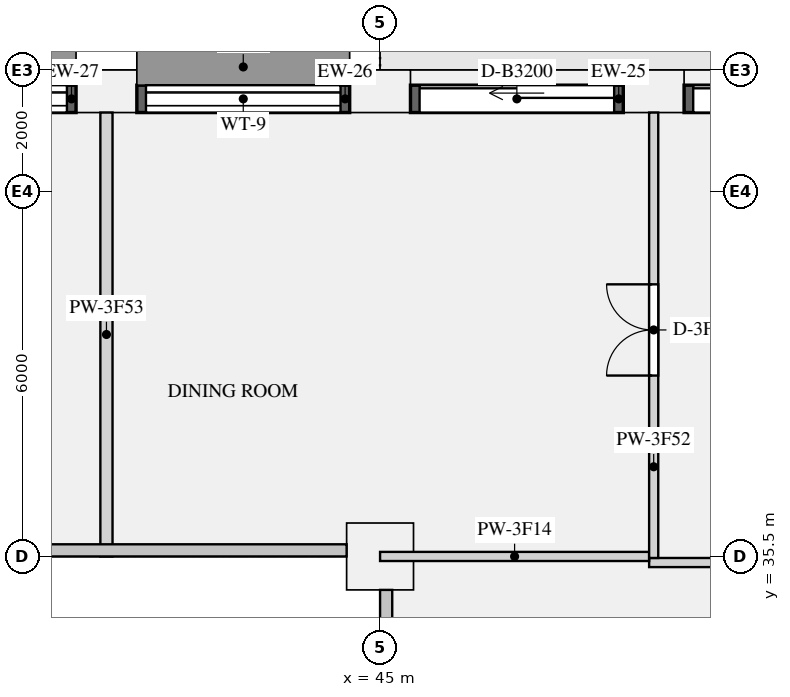
"""IFC4 building model, lengths in metres.
Left out: names, types, materials, properties, quantities, classifications, styles, units other than length and angle.
Written with IfcOpenShell. Run it as: python <this file> out.ifc"""

import sys

from ifc_helpers import new_model, si_unit, direction, frame, frame_2d, origin, origin_2d, place, context, subcontext, project, spatial, rectangle, extrude, element, fill, save


model = new_model("IFC4")
c1 = context("Model", 3, precision=1e-05, world=origin(), true_north=direction((0.0, 1.0)))
c2 = subcontext(c1, "Body", "Model", "MODEL_VIEW")
j1 = project(units=[si_unit("LENGTHUNIT", "METRE"), si_unit("PLANEANGLEUNIT", "RADIAN")], contexts=[c1])
p1 = place(None, origin())
s1 = spatial("IfcSite", under=j1, at=p1, CompositionType="ELEMENT")
p2 = place(p1, origin())
s2 = spatial("IfcBuilding", under=s1, at=p2, CompositionType="ELEMENT")
p3 = place(p2, frame((0.0, 0.0, 179.1)))
s3 = spatial("IfcBuildingStorey", under=s2, at=p3, CompositionType="ELEMENT", Elevation=179.1)
for number, where, z_axis, x_axis in (
    (1, (49.5, 43.15, 0.0), (0.0, 0.0, 1.0), (-1.0, 0.0, 0.0)),
    (2, (45.0, 43.15, 0.0), (0.0, 0.0, 1.0), (-1.0, 0.0, 0.0)),
    (3, (40.5, 43.15, 0.0), (0.0, 0.0, 1.0), (-1.0, 0.0, 0.0)),
):
    element("IfcColumn", number, at=place(p3, frame(where, z_axis=z_axis, x_axis=x_axis)), inside=s3, PredefinedType="USERDEFINED", context=c2, shape_type="SweptSolid", body=[
        extrude(rectangle(XDim=1.0, YDim=0.7, at=origin_2d()), origin(), (0.0, 0.0, 1.0), 3.15),
    ])
p4 = place(p3, frame((45.0, 35.5, 0.0), z_axis=(0.0, 0.0, 1.0), x_axis=(1.0, 0.0, 0.0)))
e4 = element("IfcColumn", 4, at=p4, inside=s3, PredefinedType="COLUMN", context=c2, shape_type="SweptSolid", body=[
    extrude(rectangle(XDim=1.1, YDim=1.1, at=origin_2d()), origin(), (0.0, 0.0, 1.0), 3.15),
])
p5 = place(p3, frame((53.5, 43.025, 0.0), z_axis=(0.0, 0.0, 1.0), x_axis=(-1.0, 0.0, 0.0)))
e5 = element("IfcWall", 5, at=p5, inside=s3, PredefinedType="SOLIDWALL", context=c2, shape_type="SweptSolid", body=[
    extrude(rectangle(XDim=3.5, YDim=0.45, at=frame_2d((1.75, 0.0))), origin(), (0.0, 0.0, 1.0), 2.83),
])
p6 = place(p5, frame((0.15, 0.0, 0.0)))
e6 = element("IfcOpeningElement", 6, at=p6, cuts=e5, PredefinedType="OPENING", context=c2, shape_type="SweptSolid", body=[
    extrude(rectangle(XDim=3.2, YDim=2.3, at=frame_2d((1.6, 1.15))), frame((0.0, 0.235, 0.0), z_axis=(0.0, -1.0, 0.0), x_axis=(1.0, 0.0, 0.0)), (0.0, 0.0, 1.0), 0.47),
])
p7 = place(p3, frame((49.0, 43.025, 0.0), z_axis=(0.0, 0.0, 1.0), x_axis=(-1.0, 0.0, 0.0)))
e7 = element("IfcWall", 7, at=p7, inside=s3, PredefinedType="SOLIDWALL", context=c2, shape_type="SweptSolid", body=[
    extrude(rectangle(XDim=3.5, YDim=0.45, at=frame_2d((1.75, 0.0))), origin(), (0.0, 0.0, 1.0), 2.83),
])
p8 = place(p7, frame((0.15, 0.0, 0.0)))
e8 = element("IfcOpeningElement", 8, at=p8, cuts=e7, PredefinedType="OPENING", context=c2, shape_type="SweptSolid", body=[
    extrude(rectangle(XDim=3.2, YDim=2.3, at=frame_2d((1.6, 1.15))), frame((0.0, 0.235, 0.0), z_axis=(0.0, -1.0, 0.0), x_axis=(1.0, 0.0, 0.0)), (0.0, 0.0, 1.0), 0.47),
])
p9 = place(p3, frame((44.5, 43.025, 0.9), z_axis=(0.0, 0.0, 1.0), x_axis=(-1.0, 0.0, 0.0)))
e9 = element("IfcWall", 9, at=p9, inside=s3, PredefinedType="SOLIDWALL", context=c2, shape_type="SweptSolid", body=[
    extrude(rectangle(XDim=3.5, YDim=0.45, at=frame_2d((1.75, 0.0))), origin(), (0.0, 0.0, 1.0), 1.93),
])
p10 = place(p9, frame((0.15, 0.0, 0.15)))
e10 = element("IfcOpeningElement", 10, at=p10, cuts=e9, PredefinedType="OPENING", context=c2, shape_type="SweptSolid", body=[
    extrude(rectangle(XDim=3.2, YDim=1.5, at=frame_2d((1.6, 0.75))), frame((0.0, 0.235, 0.0), z_axis=(0.0, -1.0, 0.0), x_axis=(1.0, 0.0, 0.0)), (0.0, 0.0, 1.0), 0.47),
])
p11 = place(p3, frame((40.0, 43.025, 0.9), z_axis=(0.0, 0.0, 1.0), x_axis=(-1.0, 0.0, 0.0)))
e11 = element("IfcWall", 11, at=p11, inside=s3, PredefinedType="SOLIDWALL", context=c2, shape_type="SweptSolid", body=[
    extrude(rectangle(XDim=3.5, YDim=0.45, at=frame_2d((1.75, 0.0))), origin(), (0.0, 0.0, 1.0), 1.93),
])
p12 = place(p11, frame((0.15, 0.0, 0.15)))
e12 = element("IfcOpeningElement", 12, at=p12, cuts=e11, PredefinedType="OPENING", context=c2, shape_type="SweptSolid", body=[
    extrude(rectangle(XDim=3.2, YDim=1.5, at=frame_2d((1.6, 0.75))), frame((0.0, 0.235, 0.0), z_axis=(0.0, -1.0, 0.0), x_axis=(1.0, 0.0, 0.0)), (0.0, 0.0, 1.0), 0.47),
])
p13 = place(p3, frame((49.425, 35.4, 0.0), z_axis=(0.0, 0.0, 1.0), x_axis=(1.0, 0.0, 0.0)))
e13 = element("IfcWall", 13, at=p13, inside=s3, PredefinedType="PARTITIONING", context=c2, shape_type="SweptSolid", body=[
    extrude(rectangle(XDim=6.775, YDim=0.15, at=frame_2d((3.387, 0.0))), origin(), (0.0, 0.0, 1.0), 2.83),
])
p14 = place(p13, frame((1.6, 0.0, 0.0)))
e14 = element("IfcOpeningElement", 14, at=p14, cuts=e13, PredefinedType="OPENING", context=c2, shape_type="SweptSolid", body=[
    extrude(rectangle(XDim=0.9, YDim=2.1, at=frame_2d((0.45, 1.05))), frame((0.0, 0.085, 0.0), z_axis=(0.0, -1.0, 0.0), x_axis=(1.0, 0.0, 0.0)), (0.0, 0.0, 1.0), 0.17),
])
p15 = place(p3, frame((45.0, 35.5, 0.0), z_axis=(0.0, 0.0, 1.0), x_axis=(1.0, 0.0, 0.0)))
e15 = element("IfcWall", 15, at=p15, inside=s3, PredefinedType="PARTITIONING", context=c2, shape_type="SweptSolid", body=[
    extrude(rectangle(XDim=4.425, YDim=0.15, at=frame_2d((2.212, 0.0))), origin(), (0.0, 0.0, 1.0), 2.83),
])
p16 = place(p3, frame((49.5, 35.475, 0.0), z_axis=(0.0, 0.0, 1.0), x_axis=(0.0, 1.0, 0.0)))
e16 = element("IfcWall", 16, at=p16, inside=s3, PredefinedType="PARTITIONING", context=c2, shape_type="SweptSolid", body=[
    extrude(rectangle(XDim=7.325, YDim=0.15, at=frame_2d((3.663, 0.0))), origin(), (0.0, 0.0, 1.0), 2.83),
])
p17 = place(p16, frame((3.0, 0.0, 0.0)))
e17 = element("IfcOpeningElement", 17, at=p17, cuts=e16, PredefinedType="OPENING", context=c2, shape_type="SweptSolid", body=[
    extrude(rectangle(XDim=1.5, YDim=2.1, at=frame_2d((0.75, 1.05))), frame((0.0, 0.085, 0.0), z_axis=(0.0, -1.0, 0.0), x_axis=(1.0, 0.0, 0.0)), (0.0, 0.0, 1.0), 0.17),
])
p18 = place(p3, frame((40.5, 35.5, 0.0), z_axis=(0.0, 0.0, 1.0), x_axis=(0.0, 1.0, 0.0)))
e18 = element("IfcWall", 18, at=p18, inside=s3, PredefinedType="PARTITIONING", context=c2, shape_type="SweptSolid", body=[
    extrude(rectangle(XDim=7.3, YDim=0.2, at=frame_2d((3.65, 0.0))), origin(), (0.0, 0.0, 1.0), 2.83),
])
p19 = place(p6, origin())
e19 = element("IfcDoor", 19, at=p19, inside=s3, OperationType="SLIDING_TO_LEFT", PredefinedType="DOOR", context=c2, shape_type="SweptSolid", body=[
    extrude(rectangle(XDim=3.2, YDim=2.3, at=frame_2d((1.6, 1.15))), frame((0.0, -0.07, 0.0), z_axis=(0.0, -1.0, 0.0), x_axis=(1.0, 0.0, 0.0)), (0.0, 0.0, 1.0), 0.05),
])
fill(e6, e19)
p20 = place(p8, origin())
e20 = element("IfcDoor", 20, at=p20, inside=s3, OperationType="SLIDING_TO_LEFT", PredefinedType="DOOR", context=c2, shape_type="SweptSolid", body=[
    extrude(rectangle(XDim=3.2, YDim=2.3, at=frame_2d((1.6, 1.15))), frame((0.0, -0.07, 0.0), z_axis=(0.0, -1.0, 0.0), x_axis=(1.0, 0.0, 0.0)), (0.0, 0.0, 1.0), 0.05),
])
fill(e8, e20)
p21 = place(p10, origin())
e21 = element("IfcWindow", 21, at=p21, inside=s3, PartitioningType="SINGLE_PANEL", PredefinedType="WINDOW", context=c2, shape_type="SweptSolid", body=[
    extrude(rectangle(XDim=3.2, YDim=1.5, at=frame_2d((1.6, 0.75))), frame((0.0, -0.065, 0.0), z_axis=(0.0, -1.0, 0.0), x_axis=(1.0, 0.0, 0.0)), (0.0, 0.0, 1.0), 0.06),
])
fill(e10, e21)
p22 = place(p12, origin())
e22 = element("IfcWindow", 22, at=p22, inside=s3, PartitioningType="SINGLE_PANEL", PredefinedType="WINDOW", context=c2, shape_type="SweptSolid", body=[
    extrude(rectangle(XDim=3.2, YDim=1.5, at=frame_2d((1.6, 0.75))), frame((0.0, -0.065, 0.0), z_axis=(0.0, -1.0, 0.0), x_axis=(1.0, 0.0, 0.0)), (0.0, 0.0, 1.0), 0.06),
])
fill(e12, e22)
p23 = place(p17, origin())
e23 = element("IfcDoor", 23, at=p23, inside=s3, OperationType="DOUBLE_DOOR_SINGLE_SWING", PredefinedType="DOOR", context=c2, shape_type="SweptSolid", body=[
    extrude(rectangle(XDim=1.5, YDim=2.1, at=frame_2d((0.75, 1.05))), frame((0.0, 0.025, 0.0), z_axis=(0.0, -1.0, 0.0), x_axis=(1.0, 0.0, 0.0)), (0.0, 0.0, 1.0), 0.05),
])
fill(e17, e23)
save(model, sys.argv[1])
